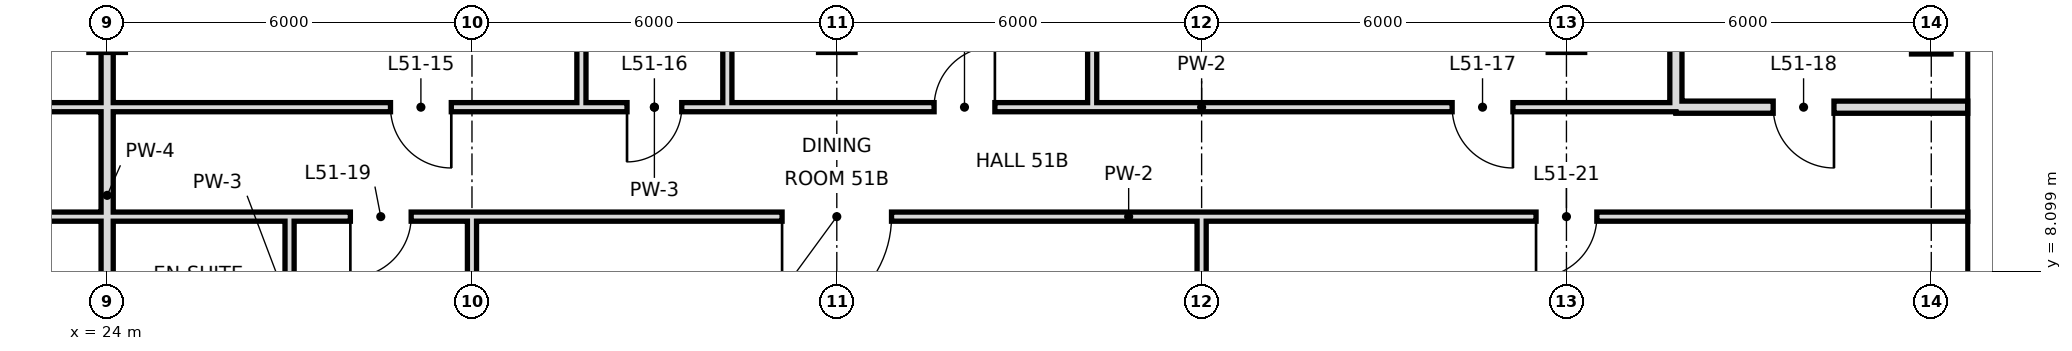
"""IFC4 building model, lengths in metres.
Left out: names, types, materials, properties, quantities, classifications, styles, units other than length and angle.
Written with IfcOpenShell. Run it as: python <this file> out.ifc"""

import sys

from ifc_helpers import new_model, si_unit, direction, frame, frame_2d, origin, origin_2d, place, context, subcontext, project, spatial, rectangle, hollow_rectangle, extrude, element, fill, save


model = new_model("IFC4")
c1 = context("Model", 3, precision=1e-05, world=origin(), true_north=direction((0.0, 1.0)))
c2 = subcontext(c1, "Body", "Model", "MODEL_VIEW")
j1 = project(units=[si_unit("LENGTHUNIT", "METRE"), si_unit("PLANEANGLEUNIT", "RADIAN")], contexts=[c1])
p1 = place(None, origin())
s1 = spatial("IfcSite", under=j1, at=p1, CompositionType="ELEMENT")
p2 = place(p1, origin())
s2 = spatial("IfcBuilding", under=s1, at=p2, CompositionType="ELEMENT")
p3 = place(p2, frame((0.0, 0.0, 219.0)))
s3 = spatial("IfcBuildingStorey", under=s2, at=p3, CompositionType="ELEMENT", Elevation=219.0)
p4 = place(p3, frame((54.0, 12.0, 0.0), z_axis=(0.0, 0.0, 1.0), x_axis=(1.0, 0.0, 0.0)))
e1 = element("IfcColumn", 1, at=p4, inside=s3, PredefinedType="COLUMN", context=c2, shape_type="SweptSolid", body=[
    extrude(hollow_rectangle(XDim=0.65, YDim=0.65, WallThickness=0.032, at=origin_2d()), origin(), (0.0, 0.0, 1.0), 3.6),
])
p5 = place(p3, frame((24.0, 0.0, 0.0), z_axis=(0.0, 0.0, 1.0), x_axis=(0.0, 1.0, 0.0)))
e2 = element("IfcWall", 2, at=p5, inside=s3, PredefinedType="SOLIDWALL", context=c2, shape_type="SweptSolid", body=[
    extrude(rectangle(XDim=18.7, YDim=0.2, at=frame_2d((9.35, 0.0))), origin(), (0.0, 0.0, 1.0), 2.72),
])
p6 = place(p3, frame((27.0, 6.0, 0.0), z_axis=(0.0, 0.0, 1.0), x_axis=(0.0, 1.0, 0.0)))
e3 = element("IfcWall", 3, at=p6, inside=s3, PredefinedType="PARTITIONING", context=c2, shape_type="SweptSolid", body=[
    extrude(rectangle(XDim=3.0, YDim=0.15, at=frame_2d((1.5, 0.0))), origin(), (0.0, 0.0, 1.0), 3.42),
])
p7 = place(p3, frame((30.0, -0.6, 0.0), z_axis=(0.0, 0.0, 1.0), x_axis=(0.0, 1.0, 0.0)))
e4 = element("IfcWall", 4, at=p7, inside=s3, PredefinedType="PARTITIONING", context=c2, shape_type="SweptSolid", body=[
    extrude(rectangle(XDim=9.6, YDim=0.15, at=frame_2d((4.8, 0.0))), origin(), (0.0, 0.0, 1.0), 2.72),
])
for number, where, z_axis, x_axis in (
    (5, (31.8, 10.8, 0.0), (0.0, 0.0, 1.0), (0.0, 1.0, 0.0)),
    (6, (34.2, 10.8, 0.0), (0.0, 0.0, 1.0), (0.0, 1.0, 0.0)),
    (7, (40.2, 10.8, 0.0), (0.0, 0.0, 1.0), (0.0, 1.0, 0.0)),
):
    element("IfcWall", number, at=place(p3, frame(where, z_axis=z_axis, x_axis=x_axis)), inside=s3, PredefinedType="PARTITIONING", context=c2, shape_type="SweptSolid", body=[
        extrude(rectangle(XDim=7.9, YDim=0.15, at=frame_2d((3.95, 0.0))), origin(), (0.0, 0.0, 1.0), 3.42),
    ])
p8 = place(p3, frame((42.0, -0.6, 0.0), z_axis=(0.0, 0.0, 1.0), x_axis=(0.0, 1.0, 0.0)))
e8 = element("IfcWall", 8, at=p8, inside=s3, PredefinedType="PARTITIONING", context=c2, shape_type="SweptSolid", body=[
    extrude(rectangle(XDim=9.6, YDim=0.15, at=frame_2d((4.8, 0.0))), origin(), (0.0, 0.0, 1.0), 2.72),
])
p9 = place(p3, frame((49.8, 10.8, 0.0), z_axis=(0.0, 0.0, 1.0), x_axis=(0.0, 1.0, 0.0)))
e9 = element("IfcWall", 9, at=p9, inside=s3, PredefinedType="SOLIDWALL", context=c2, shape_type="SweptSolid", body=[
    extrude(rectangle(XDim=7.2, YDim=0.2, at=frame_2d((3.6, 0.0))), origin(), (0.0, 0.0, 1.0), 2.97),
])
p10 = place(p3, frame((49.8, 10.8, 0.0), z_axis=(0.0, 0.0, 1.0), x_axis=(1.0, 0.0, 0.0)))
e10 = element("IfcWall", 10, at=p10, inside=s3, PredefinedType="SOLIDWALL", context=c2, shape_type="SweptSolid", body=[
    extrude(rectangle(XDim=4.8, YDim=0.2, at=frame_2d((2.4, 0.0))), origin(), (0.0, 0.0, 1.0), 2.97),
])
p11 = place(p10, frame((1.6, 0.0, 0.0)))
e11 = element("IfcOpeningElement", 11, at=p11, cuts=e10, PredefinedType="OPENING", context=c2, shape_type="SweptSolid", body=[
    extrude(rectangle(XDim=1.0, YDim=2.4, at=frame_2d((0.5, 1.2))), frame((0.0, 0.11, 0.0), z_axis=(0.0, -1.0, 0.0), x_axis=(1.0, 0.0, 0.0)), (0.0, 0.0, 1.0), 0.22),
])
p12 = place(p3, frame((7.2, 10.8, 0.0), z_axis=(0.0, 0.0, 1.0), x_axis=(1.0, 0.0, 0.0)))
e12 = element("IfcWall", 12, at=p12, inside=s3, PredefinedType="PARTITIONING", context=c2, shape_type="SweptSolid", body=[
    extrude(rectangle(XDim=24.6, YDim=0.15, at=frame_2d((12.3, 0.0))), origin(), (0.0, 0.0, 1.0), 3.42),
])
p13 = place(p12, frame((1.6, 0.0, 0.0)))
e13 = element("IfcOpeningElement", 13, at=p13, cuts=e12, PredefinedType="OPENING", context=c2, shape_type="SweptSolid", body=[
    extrude(rectangle(XDim=1.0, YDim=2.4, at=frame_2d((0.5, 1.2))), frame((0.0, 0.085, 0.0), z_axis=(0.0, -1.0, 0.0), x_axis=(1.0, 0.0, 0.0)), (0.0, 0.0, 1.0), 0.17),
])
p14 = place(p12, frame((9.04, 0.0, 0.0)))
e14 = element("IfcOpeningElement", 14, at=p14, cuts=e12, PredefinedType="OPENING", context=c2, shape_type="SweptSolid", body=[
    extrude(rectangle(XDim=1.0, YDim=2.4, at=frame_2d((0.5, 1.2))), frame((0.0, 0.085, 0.0), z_axis=(0.0, -1.0, 0.0), x_axis=(1.0, 0.0, 0.0)), (0.0, 0.0, 1.0), 0.17),
])
p15 = place(p12, frame((21.46, 0.0, 0.0)))
e15 = element("IfcOpeningElement", 15, at=p15, cuts=e12, PredefinedType="OPENING", context=c2, shape_type="SweptSolid", body=[
    extrude(rectangle(XDim=1.0, YDim=2.4, at=frame_2d((0.5, 1.2))), frame((0.0, 0.085, 0.0), z_axis=(0.0, -1.0, 0.0), x_axis=(1.0, 0.0, 0.0)), (0.0, 0.0, 1.0), 0.17),
])
p16 = place(p3, frame((34.2, 10.8, 0.0), z_axis=(0.0, 0.0, 1.0), x_axis=(1.0, 0.0, 0.0)))
e16 = element("IfcWall", 16, at=p16, inside=s3, PredefinedType="PARTITIONING", context=c2, shape_type="SweptSolid", body=[
    extrude(rectangle(XDim=15.6, YDim=0.15, at=frame_2d((7.8, 0.0))), origin(), (0.0, 0.0, 1.0), 3.42),
])
p17 = place(p16, frame((3.4, 0.0, 0.0)))
e17 = element("IfcOpeningElement", 17, at=p17, cuts=e16, PredefinedType="OPENING", context=c2, shape_type="SweptSolid", body=[
    extrude(rectangle(XDim=1.0, YDim=2.4, at=frame_2d((0.5, 1.2))), frame((0.0, 0.085, 0.0), z_axis=(0.0, -1.0, 0.0), x_axis=(1.0, 0.0, 0.0)), (0.0, 0.0, 1.0), 0.17),
])
p18 = place(p16, frame((11.92, 0.0, 0.0)))
e18 = element("IfcOpeningElement", 18, at=p18, cuts=e16, PredefinedType="OPENING", context=c2, shape_type="SweptSolid", body=[
    extrude(rectangle(XDim=1.0, YDim=2.4, at=frame_2d((0.5, 1.2))), frame((0.0, 0.085, 0.0), z_axis=(0.0, -1.0, 0.0), x_axis=(1.0, 0.0, 0.0)), (0.0, 0.0, 1.0), 0.17),
])
p19 = place(p3, frame((31.8, 10.8, 0.0), z_axis=(0.0, 0.0, 1.0), x_axis=(1.0, 0.0, 0.0)))
e19 = element("IfcWall", 19, at=p19, inside=s3, PredefinedType="PARTITIONING", context=c2, shape_type="SweptSolid", body=[
    extrude(rectangle(XDim=2.4, YDim=0.15, at=frame_2d((1.2, 0.0))), origin(), (0.0, 0.0, 1.0), 3.42),
])
p20 = place(p19, frame((0.75, 0.0, 0.0)))
e20 = element("IfcOpeningElement", 20, at=p20, cuts=e19, PredefinedType="OPENING", context=c2, shape_type="SweptSolid", body=[
    extrude(rectangle(XDim=0.9, YDim=2.4, at=frame_2d((0.45, 1.2))), frame((0.0, 0.085, 0.0), z_axis=(0.0, -1.0, 0.0), x_axis=(1.0, 0.0, 0.0)), (0.0, 0.0, 1.0), 0.17),
])
p21 = place(p3, frame((6.0, 9.0, 0.0), z_axis=(0.0, 0.0, 1.0), x_axis=(1.0, 0.0, 0.0)))
e21 = element("IfcWall", 21, at=p21, inside=s3, PredefinedType="PARTITIONING", context=c2, shape_type="SweptSolid", body=[
    extrude(rectangle(XDim=18.0, YDim=0.15, at=frame_2d((9.0, 0.0))), origin(), (0.0, 0.0, 1.0), 3.42),
])
p22 = place(p21, frame((5.5, 0.0, 0.0)))
e22 = element("IfcOpeningElement", 22, at=p22, cuts=e21, PredefinedType="OPENING", context=c2, shape_type="SweptSolid", body=[
    extrude(rectangle(XDim=1.0, YDim=2.4, at=frame_2d((0.5, 1.2))), frame((0.0, 0.085, 0.0), z_axis=(0.0, -1.0, 0.0), x_axis=(1.0, 0.0, 0.0)), (0.0, 0.0, 1.0), 0.17),
])
p23 = place(p21, frame((13.6, 0.0, 0.0)))
e23 = element("IfcOpeningElement", 23, at=p23, cuts=e21, PredefinedType="OPENING", context=c2, shape_type="SweptSolid", body=[
    extrude(rectangle(XDim=1.0, YDim=2.4, at=frame_2d((0.5, 1.2))), frame((0.0, 0.085, 0.0), z_axis=(0.0, -1.0, 0.0), x_axis=(1.0, 0.0, 0.0)), (0.0, 0.0, 1.0), 0.17),
])
p24 = place(p3, frame((27.0, 9.0, 0.0), z_axis=(0.0, 0.0, 1.0), x_axis=(1.0, 0.0, 0.0)))
e24 = element("IfcWall", 24, at=p24, inside=s3, PredefinedType="PARTITIONING", context=c2, shape_type="SweptSolid", body=[
    extrude(rectangle(XDim=27.6, YDim=0.15, at=frame_2d((13.8, 0.0))), origin(), (0.0, 0.0, 1.0), 3.42),
])
p25 = place(p24, frame((1.0, 0.0, 0.0)))
e25 = element("IfcOpeningElement", 25, at=p25, cuts=e24, PredefinedType="OPENING", context=c2, shape_type="SweptSolid", body=[
    extrude(rectangle(XDim=1.0, YDim=2.4, at=frame_2d((0.5, 1.2))), frame((0.0, 0.085, 0.0), z_axis=(0.0, -1.0, 0.0), x_axis=(1.0, 0.0, 0.0)), (0.0, 0.0, 1.0), 0.17),
])
p26 = place(p24, frame((8.1, 0.0, 0.0)))
e26 = element("IfcOpeningElement", 26, at=p26, cuts=e24, PredefinedType="OPENING", context=c2, shape_type="SweptSolid", body=[
    extrude(rectangle(XDim=1.8, YDim=2.4, at=frame_2d((0.9, 1.2))), frame((0.0, 0.085, 0.0), z_axis=(0.0, -1.0, 0.0), x_axis=(1.0, 0.0, 0.0)), (0.0, 0.0, 1.0), 0.17),
])
p27 = place(p24, frame((20.5, 0.0, 0.0)))
e27 = element("IfcOpeningElement", 27, at=p27, cuts=e24, PredefinedType="OPENING", context=c2, shape_type="SweptSolid", body=[
    extrude(rectangle(XDim=1.0, YDim=2.4, at=frame_2d((0.5, 1.2))), frame((0.0, 0.085, 0.0), z_axis=(0.0, -1.0, 0.0), x_axis=(1.0, 0.0, 0.0)), (0.0, 0.0, 1.0), 0.17),
])
p28 = place(p3, frame((24.0, 9.0, 0.0), z_axis=(0.0, 0.0, 1.0), x_axis=(1.0, 0.0, 0.0)))
e28 = element("IfcWall", 28, at=p28, inside=s3, PredefinedType="PARTITIONING", context=c2, shape_type="SweptSolid", body=[
    extrude(rectangle(XDim=3.0, YDim=0.15, at=frame_2d((1.5, 0.0))), origin(), (0.0, 0.0, 1.0), 3.42),
])
p29 = place(p17, frame((1.0, 0.0, 0.0), z_axis=(0.0, 0.0, 1.0), x_axis=(-1.0, 0.0, 0.0)))
e29 = element("IfcDoor", 29, at=p29, inside=s3, OperationType="SINGLE_SWING_LEFT", PredefinedType="DOOR", context=c2, shape_type="SweptSolid", body=[
    extrude(rectangle(XDim=1.0, YDim=2.4, at=frame_2d((0.5, 1.2))), frame((0.0, 0.025, 0.0), z_axis=(0.0, -1.0, 0.0), x_axis=(1.0, 0.0, 0.0)), (0.0, 0.0, 1.0), 0.05),
])
fill(e17, e29)
p30 = place(p15, origin())
e30 = element("IfcDoor", 30, at=p30, inside=s3, OperationType="SINGLE_SWING_RIGHT", PredefinedType="DOOR", context=c2, shape_type="SweptSolid", body=[
    extrude(rectangle(XDim=1.0, YDim=2.4, at=frame_2d((0.5, 1.2))), frame((0.0, 0.025, 0.0), z_axis=(0.0, -1.0, 0.0), x_axis=(1.0, 0.0, 0.0)), (0.0, 0.0, 1.0), 0.05),
])
fill(e15, e30)
p31 = place(p20, frame((0.9, 0.0, 0.0), z_axis=(0.0, 0.0, 1.0), x_axis=(-1.0, 0.0, 0.0)))
e31 = element("IfcDoor", 31, at=p31, inside=s3, OperationType="SINGLE_SWING_RIGHT", PredefinedType="DOOR", context=c2, shape_type="SweptSolid", body=[
    extrude(rectangle(XDim=0.9, YDim=2.4, at=frame_2d((0.45, 1.2))), frame((0.0, 0.025, 0.0), z_axis=(0.0, -1.0, 0.0), x_axis=(1.0, 0.0, 0.0)), (0.0, 0.0, 1.0), 0.05),
])
fill(e20, e31)
p32 = place(p18, origin())
e32 = element("IfcDoor", 32, at=p32, inside=s3, OperationType="SINGLE_SWING_RIGHT", PredefinedType="DOOR", context=c2, shape_type="SweptSolid", body=[
    extrude(rectangle(XDim=1.0, YDim=2.4, at=frame_2d((0.5, 1.2))), frame((0.0, 0.025, 0.0), z_axis=(0.0, -1.0, 0.0), x_axis=(1.0, 0.0, 0.0)), (0.0, 0.0, 1.0), 0.05),
])
fill(e18, e32)
p33 = place(p11, origin())
e33 = element("IfcDoor", 33, at=p33, inside=s3, OperationType="SINGLE_SWING_RIGHT", PredefinedType="DOOR", context=c2, shape_type="SweptSolid", body=[
    extrude(rectangle(XDim=1.0, YDim=2.4, at=frame_2d((0.5, 1.2))), frame((0.0, 0.025, 0.0), z_axis=(0.0, -1.0, 0.0), x_axis=(1.0, 0.0, 0.0)), (0.0, 0.0, 1.0), 0.05),
])
fill(e11, e33)
p34 = place(p25, frame((1.0, 0.0, 0.0), z_axis=(0.0, 0.0, 1.0), x_axis=(-1.0, 0.0, 0.0)))
e34 = element("IfcDoor", 34, at=p34, inside=s3, OperationType="SINGLE_SWING_RIGHT", PredefinedType="DOOR", context=c2, shape_type="SweptSolid", body=[
    extrude(rectangle(XDim=1.0, YDim=2.4, at=frame_2d((0.5, 1.2))), frame((0.0, 0.025, 0.0), z_axis=(0.0, -1.0, 0.0), x_axis=(1.0, 0.0, 0.0)), (0.0, 0.0, 1.0), 0.05),
])
fill(e25, e34)
p35 = place(p26, frame((1.8, 0.0, 0.0), z_axis=(0.0, 0.0, 1.0), x_axis=(-1.0, 0.0, 0.0)))
e35 = element("IfcDoor", 35, at=p35, inside=s3, OperationType="SINGLE_SWING_RIGHT", PredefinedType="DOOR", context=c2, shape_type="SweptSolid", body=[
    extrude(rectangle(XDim=1.8, YDim=2.4, at=frame_2d((0.9, 1.2))), frame((0.0, 0.025, 0.0), z_axis=(0.0, -1.0, 0.0), x_axis=(1.0, 0.0, 0.0)), (0.0, 0.0, 1.0), 0.05),
])
fill(e26, e35)
p36 = place(p27, frame((1.0, 0.0, 0.0), z_axis=(0.0, 0.0, 1.0), x_axis=(-1.0, 0.0, 0.0)))
e36 = element("IfcDoor", 36, at=p36, inside=s3, OperationType="SINGLE_SWING_RIGHT", PredefinedType="DOOR", context=c2, shape_type="SweptSolid", body=[
    extrude(rectangle(XDim=1.0, YDim=2.4, at=frame_2d((0.5, 1.2))), frame((0.0, 0.025, 0.0), z_axis=(0.0, -1.0, 0.0), x_axis=(1.0, 0.0, 0.0)), (0.0, 0.0, 1.0), 0.05),
])
fill(e27, e36)
save(model, sys.argv[1])
